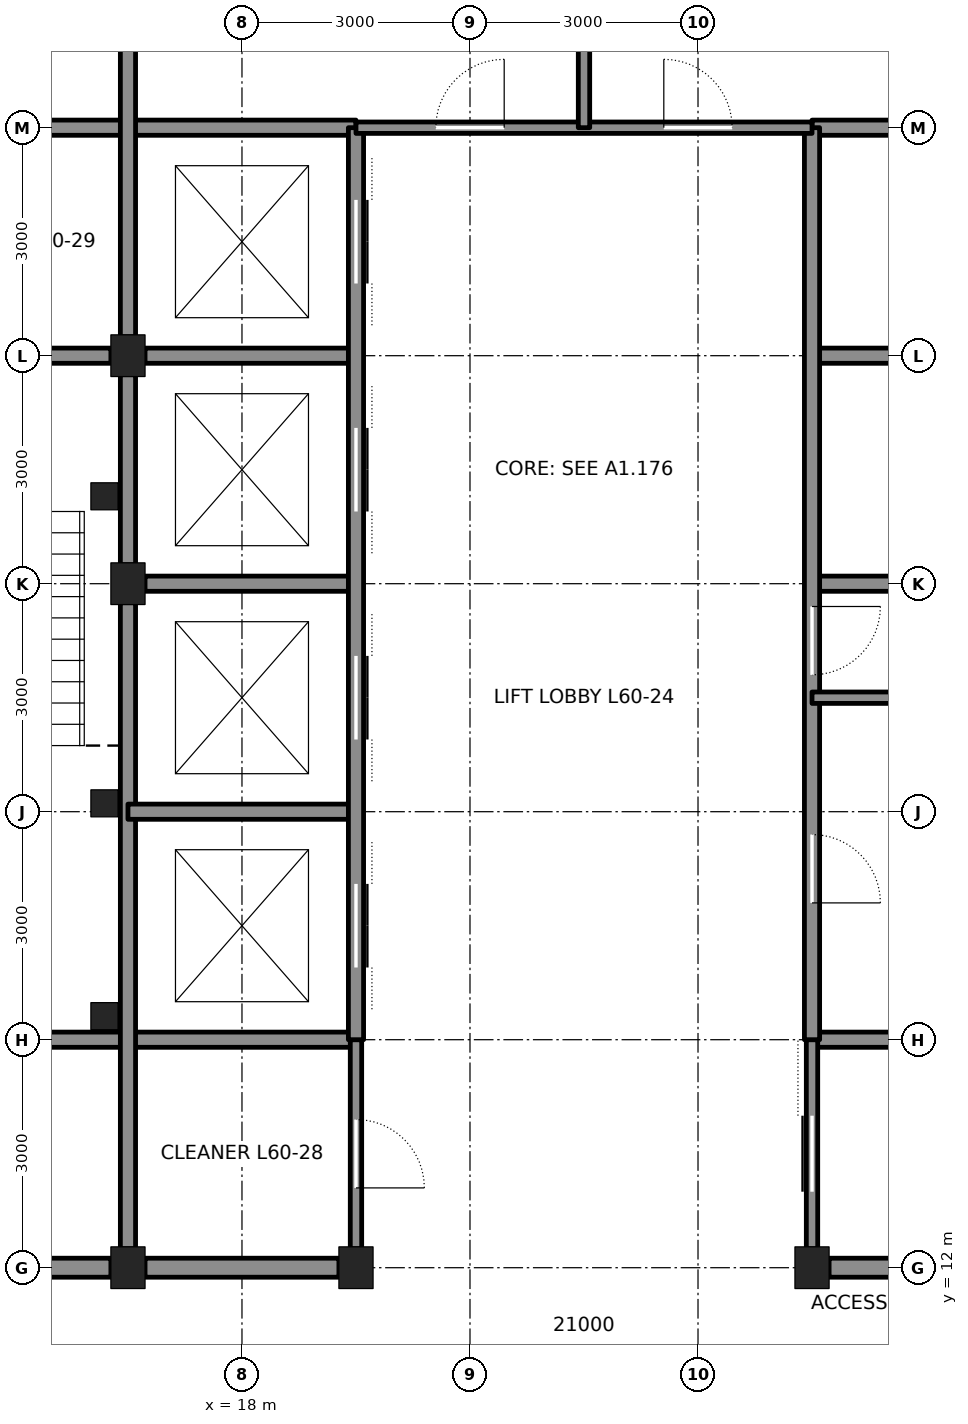
"""IFC4 building model, lengths in metres.
Left out: names, types, materials, properties, quantities, classifications, styles, units other than length and angle.
Written with IfcOpenShell. Run it as: python <this file> out.ifc"""

import sys

from ifc_helpers import new_model, si_unit, direction, frame, frame_2d, origin, origin_2d, place, context, subcontext, project, spatial, rectangle, hollow_rectangle, i_section, extrude, element, fill, save


model = new_model("IFC4")
c1 = context("Model", 3, precision=1e-05, world=origin(), true_north=direction((0.0, 1.0)))
c2 = subcontext(c1, "Body", "Model", "MODEL_VIEW")
j1 = project(units=[si_unit("LENGTHUNIT", "METRE"), si_unit("PLANEANGLEUNIT", "RADIAN")], contexts=[c1])
p1 = place(None, origin())
s1 = spatial("IfcSite", under=j1, at=p1, CompositionType="ELEMENT")
p2 = place(p1, origin())
s2 = spatial("IfcBuilding", under=s1, at=p2, CompositionType="ELEMENT")
p3 = place(p2, frame((0.0, 0.0, 270.6)))
s3 = spatial("IfcBuildingStorey", under=s2, at=p3, CompositionType="ELEMENT", Elevation=270.6)
for number, where, z_axis, x_axis in (
    (1, (16.5, 12.0, 0.0), (0.0, 0.0, 1.0), (1.0, 0.0, 0.0)),
    (2, (19.5, 12.0, 0.0), (0.0, 0.0, 1.0), (1.0, 0.0, 0.0)),
    (3, (25.5, 12.0, 0.0), (0.0, 0.0, 1.0), (1.0, 0.0, 0.0)),
    (4, (16.5, 21.0, 0.0), (0.0, 0.0, 1.0), (1.0, 0.0, 0.0)),
    (5, (16.5, 24.0, 0.0), (0.0, 0.0, 1.0), (1.0, 0.0, 0.0)),
):
    element("IfcColumn", number, at=place(p3, frame(where, z_axis=z_axis, x_axis=x_axis)), inside=s3, PredefinedType="COLUMN", context=c2, shape_type="SweptSolid", body=[
        extrude(i_section(OverallWidth=0.449, OverallDepth=0.549, WebThickness=0.072, FlangeThickness=0.115, at=origin_2d()), origin(), (0.0, 0.0, 1.0), 4.2),
    ])
p4 = place(p3, frame((12.25, 12.0, 0.0), z_axis=(0.0, 0.0, 1.0), x_axis=(1.0, 0.0, 0.0)))
e6 = element("IfcWall", 6, at=p4, inside=s3, PredefinedType="SOLIDWALL", context=c2, shape_type="SweptSolid", body=[
    extrude(rectangle(XDim=4.025, YDim=0.25, at=frame_2d((2.013, 0.0))), origin(), (0.0, 0.0, 1.0), 3.181),
])
for number, where, z_axis, x_axis in (
    (7, (16.725, 12.0, 0.0), (0.0, 0.0, 1.0), (1.0, 0.0, 0.0)),
    (8, (25.725, 12.0, 0.0), (0.0, 0.0, 1.0), (1.0, 0.0, 0.0)),
):
    element("IfcWall", number, at=place(p3, frame(where, z_axis=z_axis, x_axis=x_axis)), inside=s3, PredefinedType="SOLIDWALL", context=c2, shape_type="SweptSolid", body=[
        extrude(rectangle(XDim=2.55, YDim=0.25, at=frame_2d((1.275, 0.0))), origin(), (0.0, 0.0, 1.0), 3.181),
    ])
for number, where, z_axis, x_axis in (
    (9, (12.0, 15.0, 0.0), (0.0, 0.0, 1.0), (1.0, 0.0, 0.0)),
    (10, (25.5, 15.0, 0.0), (0.0, 0.0, 1.0), (1.0, 0.0, 0.0)),
):
    element("IfcWall", number, at=place(p3, frame(where, z_axis=z_axis, x_axis=x_axis)), inside=s3, PredefinedType="SOLIDWALL", context=c2, shape_type="SweptSolid", body=[
        extrude(rectangle(XDim=7.5, YDim=0.2, at=frame_2d((3.75, 0.0))), origin(), (0.0, 0.0, 1.0), 4.04),
    ])
p5 = place(p3, frame((12.225, 24.0, 0.0), z_axis=(0.0, 0.0, 1.0), x_axis=(1.0, 0.0, 0.0)))
e11 = element("IfcWall", 11, at=p5, inside=s3, PredefinedType="SOLIDWALL", context=c2, shape_type="SweptSolid", body=[
    extrude(rectangle(XDim=4.05, YDim=0.2, at=frame_2d((2.025, 0.0))), origin(), (0.0, 0.0, 1.0), 3.09),
])
p6 = place(p5, frame((1.425, 0.0, 0.0)))
e12 = element("IfcOpeningElement", 12, at=p6, cuts=e11, PredefinedType="OPENING", context=c2, shape_type="SweptSolid", body=[
    extrude(rectangle(XDim=1.2, YDim=2.1, at=frame_2d((0.6, 1.05))), frame((0.0, 0.11, 0.0), z_axis=(0.0, -1.0, 0.0), x_axis=(1.0, 0.0, 0.0)), (0.0, 0.0, 1.0), 0.22),
])
for number, where, z_axis, x_axis in (
    (13, (16.725, 24.0, 0.0), (0.0, 0.0, 1.0), (1.0, 0.0, 0.0)),
    (14, (25.5, 24.0, 0.0), (0.0, 0.0, 1.0), (1.0, 0.0, 0.0)),
):
    element("IfcWall", number, at=place(p3, frame(where, z_axis=z_axis, x_axis=x_axis)), inside=s3, PredefinedType="SOLIDWALL", context=c2, shape_type="SweptSolid", body=[
        extrude(rectangle(XDim=2.775, YDim=0.2, at=frame_2d((1.388, 0.0))), origin(), (0.0, 0.0, 1.0), 3.09),
    ])
p7 = place(p3, frame((12.0, 27.0, 0.0), z_axis=(0.0, 0.0, 1.0), x_axis=(1.0, 0.0, 0.0)))
e15 = element("IfcWall", 15, at=p7, inside=s3, PredefinedType="SOLIDWALL", context=c2, shape_type="SweptSolid", body=[
    extrude(rectangle(XDim=7.5, YDim=0.2, at=frame_2d((3.75, 0.0))), origin(), (0.0, 0.0, 1.0), 4.04),
])
p8 = place(p7, frame((1.65, 0.0, 0.0)))
e16 = element("IfcOpeningElement", 16, at=p8, cuts=e15, PredefinedType="OPENING", context=c2, shape_type="SweptSolid", body=[
    extrude(rectangle(XDim=1.2, YDim=2.1, at=frame_2d((0.6, 1.05))), frame((0.0, 0.11, 0.0), z_axis=(0.0, -1.0, 0.0), x_axis=(1.0, 0.0, 0.0)), (0.0, 0.0, 1.0), 0.22),
])
p9 = place(p3, frame((25.5, 27.0, 0.0), z_axis=(0.0, 0.0, 1.0), x_axis=(1.0, 0.0, 0.0)))
e17 = element("IfcWall", 17, at=p9, inside=s3, PredefinedType="SOLIDWALL", context=c2, shape_type="SweptSolid", body=[
    extrude(rectangle(XDim=3.0, YDim=0.2, at=frame_2d((1.5, 0.0))), origin(), (0.0, 0.0, 1.0), 4.04),
])
p10 = place(p3, frame((16.5, 12.25, 0.0), z_axis=(0.0, 0.0, 1.0), x_axis=(0.0, 1.0, 0.0)))
e18 = element("IfcWall", 18, at=p10, inside=s3, PredefinedType="SOLIDWALL", context=c2, shape_type="SweptSolid", body=[
    extrude(rectangle(XDim=8.5, YDim=0.2, at=frame_2d((4.25, 0.0))), origin(), (0.0, 0.0, 1.0), 3.113),
])
p11 = place(p3, frame((16.5, 21.25, 0.0), z_axis=(0.0, 0.0, 1.0), x_axis=(0.0, 1.0, 0.0)))
e19 = element("IfcWall", 19, at=p11, inside=s3, PredefinedType="SOLIDWALL", context=c2, shape_type="SweptSolid", body=[
    extrude(rectangle(XDim=2.5, YDim=0.2, at=frame_2d((1.25, 0.0))), origin(), (0.0, 0.0, 1.0), 3.113),
])
p12 = place(p3, frame((16.5, 24.25, 0.0), z_axis=(0.0, 0.0, 1.0), x_axis=(0.0, 1.0, 0.0)))
e20 = element("IfcWall", 20, at=p12, inside=s3, PredefinedType="SOLIDWALL", context=c2, shape_type="SweptSolid", body=[
    extrude(rectangle(XDim=8.5, YDim=0.2, at=frame_2d((4.25, 0.0))), origin(), (0.0, 0.0, 1.0), 3.113),
])
p13 = place(p3, frame((16.5, 18.0, 0.0), z_axis=(0.0, 0.0, 1.0), x_axis=(1.0, 0.0, 0.0)))
e21 = element("IfcWall", 21, at=p13, inside=s3, PredefinedType="SOLIDWALL", context=c2, shape_type="SweptSolid", body=[
    extrude(rectangle(XDim=3.0, YDim=0.2, at=frame_2d((1.5, 0.0))), origin(), (0.0, 0.0, 1.0), 4.04),
])
for number, where, z_axis, x_axis in (
    (22, (16.725, 21.0, 0.0), (0.0, 0.0, 1.0), (1.0, 0.0, 0.0)),
    (23, (25.5, 21.0, 0.0), (0.0, 0.0, 1.0), (1.0, 0.0, 0.0)),
):
    element("IfcWall", number, at=place(p3, frame(where, z_axis=z_axis, x_axis=x_axis)), inside=s3, PredefinedType="SOLIDWALL", context=c2, shape_type="SweptSolid", body=[
        extrude(rectangle(XDim=2.775, YDim=0.2, at=frame_2d((1.388, 0.0))), origin(), (0.0, 0.0, 1.0), 3.09),
    ])
p14 = place(p3, frame((19.5, 12.25, 0.0), z_axis=(0.0, 0.0, 1.0), x_axis=(0.0, 1.0, 0.0)))
e24 = element("IfcWall", 24, at=p14, inside=s3, PredefinedType="PARTITIONING", context=c2, shape_type="SweptSolid", body=[
    extrude(rectangle(XDim=2.75, YDim=0.15, at=frame_2d((1.375, 0.0))), origin(), (0.0, 0.0, 1.0), 3.064),
])
p15 = place(p14, frame((0.8, 0.0, 0.0)))
e25 = element("IfcOpeningElement", 25, at=p15, cuts=e24, PredefinedType="OPENING", context=c2, shape_type="SweptSolid", body=[
    extrude(rectangle(XDim=0.9, YDim=2.1, at=frame_2d((0.45, 1.05))), frame((0.0, 0.085, 0.0), z_axis=(0.0, -1.0, 0.0), x_axis=(1.0, 0.0, 0.0)), (0.0, 0.0, 1.0), 0.17),
])
p16 = place(p3, frame((19.5, 15.0, 0.0), z_axis=(0.0, 0.0, 1.0), x_axis=(0.0, 1.0, 0.0)))
e26 = element("IfcWall", 26, at=p16, inside=s3, PredefinedType="SOLIDWALL", context=c2, shape_type="SweptSolid", body=[
    extrude(rectangle(XDim=12.0, YDim=0.2, at=frame_2d((6.0, 0.0))), origin(), (0.0, 0.0, 1.0), 3.064),
])
p17 = place(p16, frame((0.95, 0.0, 0.0)))
e27 = element("IfcOpeningElement", 27, at=p17, cuts=e26, PredefinedType="OPENING", context=c2, shape_type="SweptSolid", body=[
    extrude(rectangle(XDim=1.1, YDim=2.1, at=frame_2d((0.55, 1.05))), frame((0.0, 0.11, 0.0), z_axis=(0.0, -1.0, 0.0), x_axis=(1.0, 0.0, 0.0)), (0.0, 0.0, 1.0), 0.22),
])
p18 = place(p16, frame((3.95, 0.0, 0.0)))
e28 = element("IfcOpeningElement", 28, at=p18, cuts=e26, PredefinedType="OPENING", context=c2, shape_type="SweptSolid", body=[
    extrude(rectangle(XDim=1.1, YDim=2.1, at=frame_2d((0.55, 1.05))), frame((0.0, 0.11, 0.0), z_axis=(0.0, -1.0, 0.0), x_axis=(1.0, 0.0, 0.0)), (0.0, 0.0, 1.0), 0.22),
])
p19 = place(p16, frame((6.95, 0.0, 0.0)))
e29 = element("IfcOpeningElement", 29, at=p19, cuts=e26, PredefinedType="OPENING", context=c2, shape_type="SweptSolid", body=[
    extrude(rectangle(XDim=1.1, YDim=2.1, at=frame_2d((0.55, 1.05))), frame((0.0, 0.11, 0.0), z_axis=(0.0, -1.0, 0.0), x_axis=(1.0, 0.0, 0.0)), (0.0, 0.0, 1.0), 0.22),
])
p20 = place(p16, frame((9.95, 0.0, 0.0)))
e30 = element("IfcOpeningElement", 30, at=p20, cuts=e26, PredefinedType="OPENING", context=c2, shape_type="SweptSolid", body=[
    extrude(rectangle(XDim=1.1, YDim=2.1, at=frame_2d((0.55, 1.05))), frame((0.0, 0.11, 0.0), z_axis=(0.0, -1.0, 0.0), x_axis=(1.0, 0.0, 0.0)), (0.0, 0.0, 1.0), 0.22),
])
p21 = place(p3, frame((25.5, 12.25, 0.0), z_axis=(0.0, 0.0, 1.0), x_axis=(0.0, 1.0, 0.0)))
e31 = element("IfcWall", 31, at=p21, inside=s3, PredefinedType="PARTITIONING", context=c2, shape_type="SweptSolid", body=[
    extrude(rectangle(XDim=2.75, YDim=0.15, at=frame_2d((1.375, 0.0))), origin(), (0.0, 0.0, 1.0), 3.064),
])
p22 = place(p21, frame((0.75, 0.0, 0.0)))
e32 = element("IfcOpeningElement", 32, at=p22, cuts=e31, PredefinedType="OPENING", context=c2, shape_type="SweptSolid", body=[
    extrude(rectangle(XDim=1.0, YDim=2.1, at=frame_2d((0.5, 1.05))), frame((0.0, 0.085, 0.0), z_axis=(0.0, -1.0, 0.0), x_axis=(1.0, 0.0, 0.0)), (0.0, 0.0, 1.0), 0.17),
])
p23 = place(p3, frame((25.5, 15.0, 0.0), z_axis=(0.0, 0.0, 1.0), x_axis=(0.0, 1.0, 0.0)))
e33 = element("IfcWall", 33, at=p23, inside=s3, PredefinedType="SOLIDWALL", context=c2, shape_type="SweptSolid", body=[
    extrude(rectangle(XDim=12.0, YDim=0.2, at=frame_2d((6.0, 0.0))), origin(), (0.0, 0.0, 1.0), 3.064),
])
p24 = place(p23, frame((1.8, 0.0, 0.0)))
e34 = element("IfcOpeningElement", 34, at=p24, cuts=e33, PredefinedType="OPENING", context=c2, shape_type="SweptSolid", body=[
    extrude(rectangle(XDim=0.9, YDim=2.1, at=frame_2d((0.45, 1.05))), frame((0.0, 0.11, 0.0), z_axis=(0.0, -1.0, 0.0), x_axis=(1.0, 0.0, 0.0)), (0.0, 0.0, 1.0), 0.22),
])
p25 = place(p23, frame((4.8, 0.0, 0.0)))
e35 = element("IfcOpeningElement", 35, at=p25, cuts=e33, PredefinedType="OPENING", context=c2, shape_type="SweptSolid", body=[
    extrude(rectangle(XDim=0.9, YDim=2.1, at=frame_2d((0.45, 1.05))), frame((0.0, 0.11, 0.0), z_axis=(0.0, -1.0, 0.0), x_axis=(1.0, 0.0, 0.0)), (0.0, 0.0, 1.0), 0.22),
])
p26 = place(p3, frame((19.5, 27.0, 0.0), z_axis=(0.0, 0.0, 1.0), x_axis=(1.0, 0.0, 0.0)))
e36 = element("IfcWall", 36, at=p26, inside=s3, PredefinedType="PARTITIONING", context=c2, shape_type="SweptSolid", body=[
    extrude(rectangle(XDim=6.0, YDim=0.15, at=frame_2d((3.0, 0.0))), origin(), (0.0, 0.0, 1.0), 4.04),
])
p27 = place(p26, frame((1.05, 0.0, 0.0)))
e37 = element("IfcOpeningElement", 37, at=p27, cuts=e36, PredefinedType="OPENING", context=c2, shape_type="SweptSolid", body=[
    extrude(rectangle(XDim=0.9, YDim=2.1, at=frame_2d((0.45, 1.05))), frame((0.0, 0.085, 0.0), z_axis=(0.0, -1.0, 0.0), x_axis=(1.0, 0.0, 0.0)), (0.0, 0.0, 1.0), 0.17),
])
p28 = place(p26, frame((4.05, 0.0, 0.0)))
e38 = element("IfcOpeningElement", 38, at=p28, cuts=e36, PredefinedType="OPENING", context=c2, shape_type="SweptSolid", body=[
    extrude(rectangle(XDim=0.9, YDim=2.1, at=frame_2d((0.45, 1.05))), frame((0.0, 0.085, 0.0), z_axis=(0.0, -1.0, 0.0), x_axis=(1.0, 0.0, 0.0)), (0.0, 0.0, 1.0), 0.17),
])
p29 = place(p3, frame((22.5, 27.0, 0.0), z_axis=(0.0, 0.0, 1.0), x_axis=(0.0, 1.0, 0.0)))
e39 = element("IfcWall", 39, at=p29, inside=s3, PredefinedType="PARTITIONING", context=c2, shape_type="SweptSolid", body=[
    extrude(rectangle(XDim=6.0, YDim=0.15, at=frame_2d((3.0, 0.0))), origin(), (0.0, 0.0, 1.0), 4.04),
])
p30 = place(p3, frame((25.5, 19.5, 0.0), z_axis=(0.0, 0.0, 1.0), x_axis=(1.0, 0.0, 0.0)))
e40 = element("IfcWall", 40, at=p30, inside=s3, PredefinedType="PARTITIONING", context=c2, shape_type="SweptSolid", body=[
    extrude(rectangle(XDim=3.0, YDim=0.15, at=frame_2d((1.5, 0.0))), origin(), (0.0, 0.0, 1.0), 4.04),
])
for number, where, z_axis, x_axis in (
    (41, (16.19, 15.31, 0.0), (0.0, 0.0, 1.0), (1.0, 0.0, 0.0)),
    (42, (16.19, 18.11, 0.0), (0.0, 0.0, 1.0), (1.0, 0.0, 0.0)),
    (43, (16.19, 22.15, 0.0), (0.0, 0.0, 1.0), (1.0, 0.0, 0.0)),
):
    element("IfcColumn", number, at=place(p3, frame(where, z_axis=z_axis, x_axis=x_axis)), inside=s3, PredefinedType="COLUMN", context=c2, shape_type="SweptSolid", body=[
        extrude(hollow_rectangle(XDim=0.356, YDim=0.356, WallThickness=0.009, at=origin_2d()), origin(), (0.0, 0.0, 1.0), 4.2),
    ])
p31 = place(p27, origin())
e44 = element("IfcDoor", 44, at=p31, inside=s3, OperationType="SINGLE_SWING_RIGHT", PredefinedType="DOOR", context=c2, shape_type="SweptSolid", body=[
    extrude(rectangle(XDim=0.9, YDim=2.1, at=frame_2d((0.45, 1.05))), frame((0.0, 0.025, 0.0), z_axis=(0.0, -1.0, 0.0), x_axis=(1.0, 0.0, 0.0)), (0.0, 0.0, 1.0), 0.05),
])
fill(e37, e44)
p32 = place(p28, origin())
e45 = element("IfcDoor", 45, at=p32, inside=s3, OperationType="SINGLE_SWING_LEFT", PredefinedType="DOOR", context=c2, shape_type="SweptSolid", body=[
    extrude(rectangle(XDim=0.9, YDim=2.1, at=frame_2d((0.45, 1.05))), frame((0.0, 0.025, 0.0), z_axis=(0.0, -1.0, 0.0), x_axis=(1.0, 0.0, 0.0)), (0.0, 0.0, 1.0), 0.05),
])
fill(e38, e45)
p33 = place(p22, origin())
e46 = element("IfcDoor", 46, at=p33, inside=s3, OperationType="SLIDING_TO_LEFT", PredefinedType="DOOR", context=c2, shape_type="SweptSolid", body=[
    extrude(rectangle(XDim=1.0, YDim=2.1, at=frame_2d((0.5, 1.05))), frame((0.0, 0.025, 0.0), z_axis=(0.0, -1.0, 0.0), x_axis=(1.0, 0.0, 0.0)), (0.0, 0.0, 1.0), 0.05),
])
fill(e32, e46)
p34 = place(p24, frame((0.9, 0.0, 0.0), z_axis=(0.0, 0.0, 1.0), x_axis=(-1.0, 0.0, 0.0)))
e47 = element("IfcDoor", 47, at=p34, inside=s3, OperationType="SINGLE_SWING_RIGHT", PredefinedType="DOOR", context=c2, shape_type="SweptSolid", body=[
    extrude(rectangle(XDim=0.9, YDim=2.1, at=frame_2d((0.45, 1.05))), frame((0.0, 0.025, 0.0), z_axis=(0.0, -1.0, 0.0), x_axis=(1.0, 0.0, 0.0)), (0.0, 0.0, 1.0), 0.05),
])
fill(e34, e47)
p35 = place(p25, frame((0.9, 0.0, 0.0), z_axis=(0.0, 0.0, 1.0), x_axis=(-1.0, 0.0, 0.0)))
e48 = element("IfcDoor", 48, at=p35, inside=s3, OperationType="SINGLE_SWING_LEFT", PredefinedType="DOOR", context=c2, shape_type="SweptSolid", body=[
    extrude(rectangle(XDim=0.9, YDim=2.1, at=frame_2d((0.45, 1.05))), frame((0.0, 0.025, 0.0), z_axis=(0.0, -1.0, 0.0), x_axis=(1.0, 0.0, 0.0)), (0.0, 0.0, 1.0), 0.05),
])
fill(e35, e48)
p36 = place(p15, frame((0.9, 0.0, 0.0), z_axis=(0.0, 0.0, 1.0), x_axis=(-1.0, 0.0, 0.0)))
e49 = element("IfcDoor", 49, at=p36, inside=s3, OperationType="SINGLE_SWING_RIGHT", PredefinedType="DOOR", context=c2, shape_type="SweptSolid", body=[
    extrude(rectangle(XDim=0.9, YDim=2.1, at=frame_2d((0.45, 1.05))), frame((0.0, 0.025, 0.0), z_axis=(0.0, -1.0, 0.0), x_axis=(1.0, 0.0, 0.0)), (0.0, 0.0, 1.0), 0.05),
])
fill(e25, e49)
p37 = place(p17, origin())
e50 = element("IfcDoor", 50, at=p37, inside=s3, OperationType="DOUBLE_DOOR_SLIDING", PredefinedType="DOOR", context=c2, shape_type="SweptSolid", body=[
    extrude(rectangle(XDim=1.1, YDim=2.1, at=frame_2d((0.55, 1.05))), frame((0.0, 0.025, 0.0), z_axis=(0.0, -1.0, 0.0), x_axis=(1.0, 0.0, 0.0)), (0.0, 0.0, 1.0), 0.05),
])
fill(e27, e50)
p38 = place(p18, origin())
e51 = element("IfcDoor", 51, at=p38, inside=s3, OperationType="DOUBLE_DOOR_SLIDING", PredefinedType="DOOR", context=c2, shape_type="SweptSolid", body=[
    extrude(rectangle(XDim=1.1, YDim=2.1, at=frame_2d((0.55, 1.05))), frame((0.0, 0.025, 0.0), z_axis=(0.0, -1.0, 0.0), x_axis=(1.0, 0.0, 0.0)), (0.0, 0.0, 1.0), 0.05),
])
fill(e28, e51)
p39 = place(p19, origin())
e52 = element("IfcDoor", 52, at=p39, inside=s3, OperationType="DOUBLE_DOOR_SLIDING", PredefinedType="DOOR", context=c2, shape_type="SweptSolid", body=[
    extrude(rectangle(XDim=1.1, YDim=2.1, at=frame_2d((0.55, 1.05))), frame((0.0, 0.025, 0.0), z_axis=(0.0, -1.0, 0.0), x_axis=(1.0, 0.0, 0.0)), (0.0, 0.0, 1.0), 0.05),
])
fill(e29, e52)
p40 = place(p20, origin())
e53 = element("IfcDoor", 53, at=p40, inside=s3, OperationType="DOUBLE_DOOR_SLIDING", PredefinedType="DOOR", context=c2, shape_type="SweptSolid", body=[
    extrude(rectangle(XDim=1.1, YDim=2.1, at=frame_2d((0.55, 1.05))), frame((0.0, 0.025, 0.0), z_axis=(0.0, -1.0, 0.0), x_axis=(1.0, 0.0, 0.0)), (0.0, 0.0, 1.0), 0.05),
])
fill(e30, e53)
save(model, sys.argv[1])
